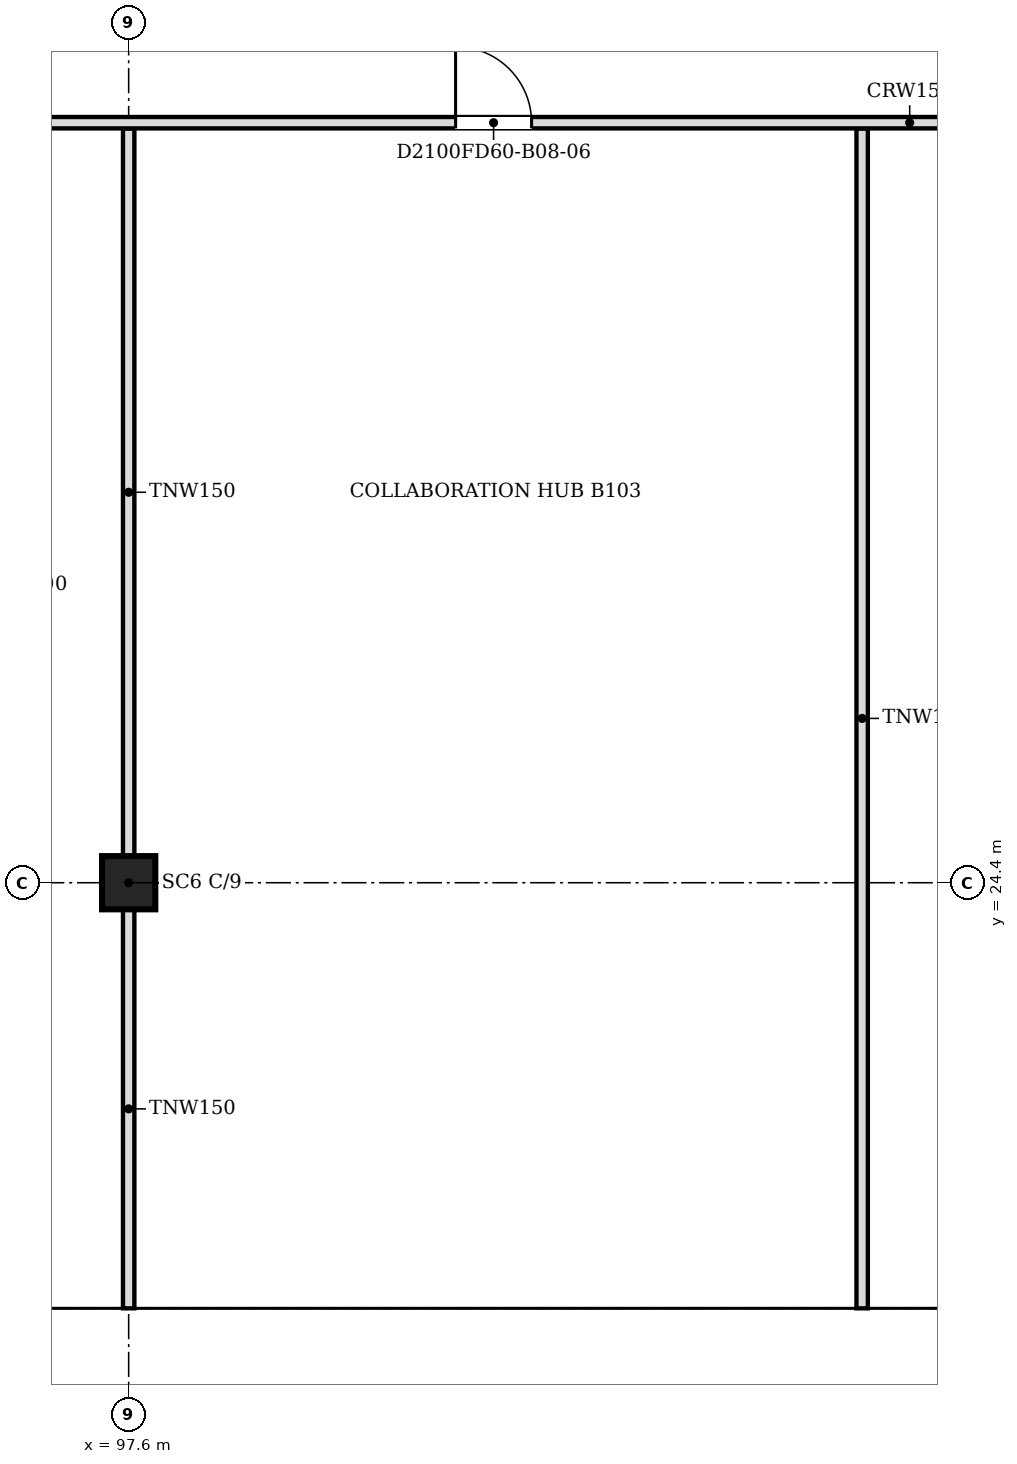
"""IFC4 building model, lengths in metres.
Left out: names, types, materials, properties, quantities, classifications, styles, units other than length and angle.
Written with IfcOpenShell. Run it as: python <this file> out.ifc"""

import sys

from ifc_helpers import new_model, si_unit, direction, frame, frame_2d, origin, origin_2d, place, context, subcontext, project, spatial, polyline, rectangle, outline, extrude, faceted_brep, source, transform, mapped, element, fill, save


model = new_model("IFC4")
c1 = context("Model", 3, precision=1e-05, world=origin(), true_north=direction((0.0, 1.0)))
c2 = subcontext(c1, "Body", "Model", "MODEL_VIEW")
j1 = project(units=[si_unit("LENGTHUNIT", "METRE"), si_unit("PLANEANGLEUNIT", "RADIAN")], contexts=[c1])
p1 = place(None, origin())
s1 = spatial("IfcSite", under=j1, at=p1, CompositionType="ELEMENT")
p2 = place(p1, origin())
s2 = spatial("IfcBuilding", under=s1, at=p2, CompositionType="ELEMENT")
p3 = place(p2, frame((0.0, 0.0, 80.0)))
s3 = spatial("IfcBuildingStorey", under=s2, at=p3, CompositionType="ELEMENT", Elevation=80.0)
p4 = place(p3, frame((97.6, 24.4, 0.0), z_axis=(0.0, 0.0, 1.0), x_axis=(1.0, 0.0, 0.0)))
e1 = element("IfcColumn", 1, at=p4, inside=s3, PredefinedType="COLUMN", context=c2, shape_type="SweptSolid", body=[
    extrude(rectangle(XDim=0.7, YDim=0.7, at=origin_2d()), origin(), (0.0, 0.0, 1.0), 3.6),
])
m1 = source(origin(), c2, "Body", "Brep", [
    faceted_brep([(3.003, -0.25, 0.0), (6.053, -0.25, 3.8), (3.003, -0.25, 7.6), (0.0, -0.25, 3.8), (0.047, 0.25, 3.859), (3.003, 0.25, 7.6), (6.053, 0.25, 3.8), (3.003, 0.25, 0.0), (0.047, 0.25, 3.741), (0.0, 0.0, 3.8)], [[[0, 1, 2, 3]], [[4, 5, 6, 7, 8]], [[7, 6, 1, 0]], [[6, 5, 2, 1]], [[5, 4, 9, 3, 2]], [[8, 7, 0, 3, 9]], [[8, 9, 4]]]),
])
p5 = place(p3, frame((91.547, 18.55, -3.8), z_axis=(0.0, 0.0, 1.0), x_axis=(1.0, 0.0, 0.0)))
e2 = element("IfcWall", 2, at=p5, inside=s3, PredefinedType="SOLIDWALL", context=c2, shape_type="MappedRepresentation", body=[
    mapped(m1, transform((0.0, 0.0, 0.0), scale=1.0)),
])
m2 = source(origin(), c2, "Body", "SweptSolid", [
    extrude(outline(polyline([(3.005, 0.401), (5.733, 3.8), (3.005, 7.199), (0.319, 3.8), (3.005, 0.401)])), frame((0.0, 0.26, 0.0), z_axis=(0.0, -1.0, 0.0), x_axis=(1.0, 0.0, 0.0)), (0.0, 0.0, 1.0), 0.52),
])
p6 = place(p5, origin())
e3 = element("IfcOpeningElement", 3, at=p6, cuts=e2, PredefinedType="OPENING", context=c2, shape_type="MappedRepresentation", body=[
    mapped(m2, transform((0.0, 0.0, 0.0), scale=1.0)),
])
m3 = source(origin(), c2, "Body", "Brep", [
    faceted_brep([(3.05, -0.25, 0.0), (6.1, -0.25, 3.8), (6.1, -0.25, 3.8), (3.05, -0.25, 7.6), (0.0, -0.25, 3.8), (0.0, 0.25, 3.8), (3.05, 0.25, 7.6), (6.1, 0.25, 3.8), (6.1, 0.25, 3.8), (3.05, 0.25, 0.0)], [[[0, 1, 2, 3, 4]], [[5, 6, 7, 8, 9]], [[9, 8, 1, 0]], [[7, 6, 3, 2]], [[6, 5, 4, 3]], [[5, 9, 0, 4]], [[1, 8, 7, 2]]]),
])
p7 = place(p3, frame((97.6, 18.55, -3.8), z_axis=(0.0, 0.0, 1.0), x_axis=(1.0, 0.0, 0.0)))
e4 = element("IfcWall", 4, at=p7, inside=s3, PredefinedType="SOLIDWALL", context=c2, shape_type="MappedRepresentation", body=[
    mapped(m3, transform((0.0, 0.0, 0.0), scale=1.0)),
])
m4 = source(origin(), c2, "Body", "SweptSolid", [
    extrude(outline(polyline([(3.05, 0.399), (5.78, 3.8), (3.05, 7.201), (0.321, 3.8), (3.05, 0.399)])), frame((0.0, 0.26, 0.0), z_axis=(0.0, -1.0, 0.0), x_axis=(1.0, 0.0, 0.0)), (0.0, 0.0, 1.0), 0.52),
])
p8 = place(p7, origin())
e5 = element("IfcOpeningElement", 5, at=p8, cuts=e4, PredefinedType="OPENING", context=c2, shape_type="MappedRepresentation", body=[
    mapped(m4, transform((0.0, 0.0, 0.0), scale=1.0)),
])
m5 = source(origin(), c2, "Body", "SweptSolid", [
    extrude(outline(polyline([(3.05, 0.0), (6.1, 3.8), (3.05, 7.6), (0.0, 3.8), (3.05, 0.0)])), frame((0.0, 0.25, 0.0), z_axis=(0.0, -1.0, 0.0), x_axis=(1.0, 0.0, 0.0)), (0.0, 0.0, 1.0), 0.5),
])
p9 = place(p3, frame((103.7, 18.55, -3.8), z_axis=(0.0, 0.0, 1.0), x_axis=(1.0, 0.0, 0.0)))
e6 = element("IfcWall", 6, at=p9, inside=s3, PredefinedType="SOLIDWALL", context=c2, shape_type="MappedRepresentation", body=[
    mapped(m5, transform((0.0, 0.0, 0.0), scale=1.0)),
])
p10 = place(p9, origin())
e7 = element("IfcOpeningElement", 7, at=p10, cuts=e6, PredefinedType="OPENING", context=c2, shape_type="MappedRepresentation", body=[
    mapped(m4, transform((0.0, 0.0, 0.0), scale=1.0)),
])
p11 = place(p2, frame((0.0, 0.0, 83.8)))
s4 = spatial("IfcBuildingStorey", under=s2, at=p11, CompositionType="ELEMENT", Elevation=83.8)
p12 = place(p11, frame((94.55, 18.55, -3.8), z_axis=(0.0, 0.0, 1.0), x_axis=(1.0, 0.0, 0.0)))
e8 = element("IfcWall", 8, at=p12, inside=s4, PredefinedType="SOLIDWALL", context=c2, shape_type="MappedRepresentation", body=[
    mapped(m3, transform((0.0, 0.0, 0.0), scale=1.0)),
])
p13 = place(p12, origin())
e9 = element("IfcOpeningElement", 9, at=p13, cuts=e8, PredefinedType="OPENING", context=c2, shape_type="MappedRepresentation", body=[
    mapped(m4, transform((0.0, 0.0, 0.0), scale=1.0)),
])
p14 = place(p11, frame((100.65, 18.55, -3.8), z_axis=(0.0, 0.0, 1.0), x_axis=(1.0, 0.0, 0.0)))
e10 = element("IfcWall", 10, at=p14, inside=s4, PredefinedType="SOLIDWALL", context=c2, shape_type="MappedRepresentation", body=[
    mapped(m5, transform((0.0, 0.0, 0.0), scale=1.0)),
])
p15 = place(p14, origin())
e11 = element("IfcOpeningElement", 11, at=p15, cuts=e10, PredefinedType="OPENING", context=c2, shape_type="MappedRepresentation", body=[
    mapped(m4, transform((0.0, 0.0, 0.0), scale=1.0)),
])
p16 = place(p11, frame((106.75, 18.55, -3.8), z_axis=(0.0, 0.0, 1.0), x_axis=(1.0, 0.0, 0.0)))
e12 = element("IfcWall", 12, at=p16, inside=s4, PredefinedType="SOLIDWALL", context=c2, shape_type="MappedRepresentation", body=[
    mapped(m5, transform((0.0, 0.0, 0.0), scale=1.0)),
])
p17 = place(p16, origin())
e13 = element("IfcOpeningElement", 13, at=p17, cuts=e12, PredefinedType="OPENING", context=c2, shape_type="MappedRepresentation", body=[
    mapped(m4, transform((0.0, 0.0, 0.0), scale=1.0)),
])
p18 = place(p3, frame((97.6, 18.8, 0.0), z_axis=(0.0, 0.0, 1.0), x_axis=(0.0, 1.0, 0.0)))
e14 = element("IfcWall", 14, at=p18, inside=s3, PredefinedType="PARTITIONING", context=c2, shape_type="SweptSolid", body=[
    extrude(rectangle(XDim=5.249, YDim=0.15, at=frame_2d((2.625, 0.0))), origin(), (0.0, 0.0, 1.0), 3.067),
])
p19 = place(p3, frame((107.25, 18.8, 0.0), z_axis=(0.0, 0.0, 1.0), x_axis=(0.0, 1.0, 0.0)))
e15 = element("IfcWall", 15, at=p19, inside=s3, PredefinedType="PARTITIONING", context=c2, shape_type="SweptSolid", body=[
    extrude(rectangle(XDim=15.524, YDim=0.15, at=frame_2d((7.762, 0.0))), origin(), (0.0, 0.0, 1.0), 3.067),
])
p20 = place(p3, frame((97.6, 24.751, 0.0), z_axis=(0.0, 0.0, 1.0), x_axis=(0.0, 1.0, 0.0)))
e16 = element("IfcWall", 16, at=p20, inside=s3, PredefinedType="PARTITIONING", context=c2, shape_type="SweptSolid", body=[
    extrude(rectangle(XDim=9.573, YDim=0.15, at=frame_2d((4.787, 0.0))), origin(), (0.0, 0.0, 1.0), 3.067),
])
p21 = place(p3, frame((133.7, 34.4, 0.0), z_axis=(0.0, 0.0, 1.0), x_axis=(-1.0, 0.0, 0.0)))
e17 = element("IfcWall", 17, at=p21, inside=s3, PredefinedType="PARTITIONING", context=c2, shape_type="SweptSolid", body=[
    extrude(rectangle(XDim=47.8, YDim=0.15, at=frame_2d((23.9, 0.0))), origin(), (0.0, 0.0, 1.0), 3.067),
])
m6 = source(origin(), c2, "Body", "SweptSolid", [
    extrude(rectangle(XDim=1.0, YDim=2.1, at=frame_2d((0.5, 1.05))), frame((0.0, 0.085, 0.0), z_axis=(0.0, -1.0, 0.0), x_axis=(1.0, 0.0, 0.0)), (0.0, 0.0, 1.0), 0.17),
])
p22 = place(p21, frame((2.099, 0.0, 0.0)))
e18 = element("IfcOpeningElement", 18, at=p22, cuts=e17, PredefinedType="OPENING", context=c2, shape_type="MappedRepresentation", body=[
    mapped(m6, transform((0.0, 0.0, 0.0), scale=1.0)),
])
p23 = place(p21, frame((9.149, 0.0, 0.0)))
e19 = element("IfcOpeningElement", 19, at=p23, cuts=e17, PredefinedType="OPENING", context=c2, shape_type="MappedRepresentation", body=[
    mapped(m6, transform((0.0, 0.0, 0.0), scale=1.0)),
])
p24 = place(p21, frame((30.799, 0.0, 0.0)))
e20 = element("IfcOpeningElement", 20, at=p24, cuts=e17, PredefinedType="OPENING", context=c2, shape_type="MappedRepresentation", body=[
    mapped(m6, transform((0.0, 0.0, 0.0), scale=1.0)),
])
p25 = place(p21, frame((41.5, 0.0, 0.0)))
e21 = element("IfcOpeningElement", 21, at=p25, cuts=e17, PredefinedType="OPENING", context=c2, shape_type="MappedRepresentation", body=[
    mapped(m6, transform((0.0, 0.0, 0.0), scale=1.0)),
])
p26 = place(p21, frame((19.85, 0.0, 0.0)))
e22 = element("IfcOpeningElement", 22, at=p26, cuts=e17, PredefinedType="OPENING", context=c2, shape_type="MappedRepresentation", body=[
    mapped(m6, transform((0.0, 0.0, 0.0), scale=1.0)),
])
m7 = source(origin(), c2, "Body", "SweptSolid", [
    extrude(rectangle(XDim=1.0, YDim=2.1, at=frame_2d((0.5, 1.05))), frame((0.0, 0.025, 0.0), z_axis=(0.0, -1.0, 0.0), x_axis=(1.0, 0.0, 0.0)), (0.0, 0.0, 1.0), 0.05),
])
p27 = place(p24, origin())
e23 = element("IfcDoor", 23, at=p27, inside=s3, OperationType="SINGLE_SWING_RIGHT", PredefinedType="DOOR", context=c2, shape_type="MappedRepresentation", body=[
    mapped(m7, transform((0.0, 0.0, 0.0), scale=1.0)),
])
fill(e20, e23)
save(model, sys.argv[1])
